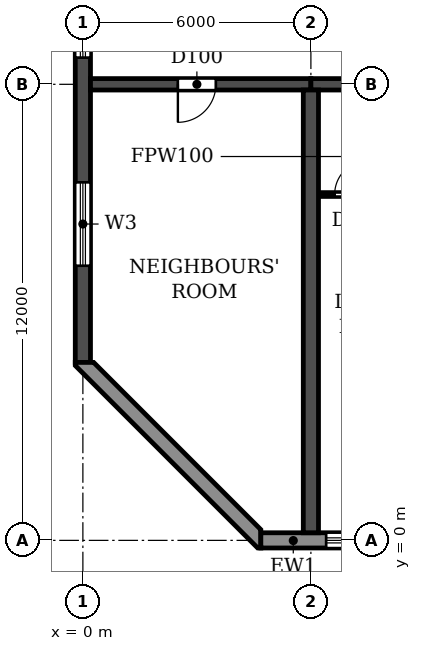
"""IFC4 building model, lengths in metres.
Left out: names, types, materials, properties, quantities, classifications, styles, units other than length and angle.
Written with IfcOpenShell. Run it as: python <this file> out.ifc"""

import sys

from ifc_helpers import new_model, si_unit, direction, frame, frame_2d, origin, place, context, subcontext, project, spatial, polyline, rectangle, outline, extrude, element, fill, save


model = new_model("IFC4")
c1 = context("Model", 3, precision=1e-05, world=origin(), true_north=direction((0.0, 1.0)))
c2 = subcontext(c1, "Body", "Model", "MODEL_VIEW")
j1 = project(units=[si_unit("LENGTHUNIT", "METRE"), si_unit("PLANEANGLEUNIT", "RADIAN")], contexts=[c1])
p1 = place(None, origin())
s1 = spatial("IfcSite", under=j1, at=p1, CompositionType="ELEMENT")
p2 = place(p1, origin())
s2 = spatial("IfcBuilding", under=s1, at=p2, CompositionType="ELEMENT")
p3 = place(p2, frame((0.0, 0.0, 33.3)))
s3 = spatial("IfcBuildingStorey", under=s2, at=p3, CompositionType="ELEMENT", Elevation=33.3)
p4 = place(p3, frame((6.0, 0.2, 0.0), z_axis=(0.0, 0.0, 1.0), x_axis=(0.0, 1.0, 0.0)))
e1 = element("IfcWall", 1, at=p4, inside=s3, PredefinedType="SHEAR", context=c2, shape_type="SweptSolid", body=[
    extrude(rectangle(XDim=11.65, YDim=0.4, at=frame_2d((5.825, 0.0))), origin(), (0.0, 0.0, 1.0), 3.05),
])
p5 = place(p3, frame((0.0, 4.683, 0.0), z_axis=(0.0, 0.0, 1.0), x_axis=(0.0, 1.0, 0.0)))
e2 = element("IfcWall", 2, at=p5, inside=s3, PredefinedType="SHEAR", context=c2, shape_type="SweptSolid", body=[
    extrude(rectangle(XDim=35.434, YDim=0.4, at=frame_2d((17.717, 0.0))), origin(), (0.0, 0.0, 1.0), 3.05),
])
p6 = place(p5, frame((23.817, 0.0, 0.9)))
e3 = element("IfcOpeningElement", 3, at=p6, cuts=e2, PredefinedType="OPENING", context=c2, shape_type="SweptSolid", body=[
    extrude(rectangle(XDim=1.2, YDim=1.5, at=frame_2d((0.6, 0.75))), frame((0.0, 0.21, 0.0), z_axis=(0.0, -1.0, 0.0), x_axis=(1.0, 0.0, 0.0)), (0.0, 0.0, 1.0), 0.42),
])
p7 = place(p5, frame((8.017, 0.0, 0.9)))
e4 = element("IfcOpeningElement", 4, at=p7, cuts=e2, PredefinedType="OPENING", context=c2, shape_type="SweptSolid", body=[
    extrude(rectangle(XDim=1.2, YDim=1.5, at=frame_2d((0.6, 0.75))), frame((0.0, 0.21, 0.0), z_axis=(0.0, -1.0, 0.0), x_axis=(1.0, 0.0, 0.0)), (0.0, 0.0, 1.0), 0.42),
])
p8 = place(p5, frame((15.917, 0.0, 0.9)))
e5 = element("IfcOpeningElement", 5, at=p8, cuts=e2, PredefinedType="OPENING", context=c2, shape_type="SweptSolid", body=[
    extrude(rectangle(XDim=1.2, YDim=1.5, at=frame_2d((0.6, 0.75))), frame((0.0, 0.21, 0.0), z_axis=(0.0, -1.0, 0.0), x_axis=(1.0, 0.0, 0.0)), (0.0, 0.0, 1.0), 0.42),
])
p9 = place(p5, frame((29.493, 0.0, 0.6)))
e6 = element("IfcOpeningElement", 6, at=p9, cuts=e2, PredefinedType="OPENING", context=c2, shape_type="SweptSolid", body=[
    extrude(rectangle(XDim=2.2, YDim=1.8, at=frame_2d((1.1, 0.9))), frame((0.0, 0.21, 0.0), z_axis=(0.0, -1.0, 0.0), x_axis=(1.0, 0.0, 0.0)), (0.0, 0.0, 1.0), 0.42),
])
p10 = place(p5, frame((2.541, 0.0, 0.6)))
e7 = element("IfcOpeningElement", 7, at=p10, cuts=e2, PredefinedType="OPENING", context=c2, shape_type="SweptSolid", body=[
    extrude(rectangle(XDim=2.2, YDim=1.8, at=frame_2d((1.1, 0.9))), frame((0.0, 0.21, 0.0), z_axis=(0.0, -1.0, 0.0), x_axis=(1.0, 0.0, 0.0)), (0.0, 0.0, 1.0), 0.42),
])
p11 = place(p3, frame((0.2, 12.0, 0.0), z_axis=(0.0, 0.0, 1.0), x_axis=(1.0, 0.0, 0.0)))
e8 = element("IfcWall", 8, at=p11, inside=s3, PredefinedType="SHEAR", context=c2, shape_type="SweptSolid", body=[
    extrude(rectangle(XDim=5.8, YDim=0.3, at=frame_2d((2.9, 0.0))), origin(), (0.0, 0.0, 1.0), 2.45),
])
p12 = place(p11, frame((2.3, 0.0, 0.0)))
e9 = element("IfcOpeningElement", 9, at=p12, cuts=e8, PredefinedType="OPENING", context=c2, shape_type="SweptSolid", body=[
    extrude(rectangle(XDim=1.0, YDim=2.1, at=frame_2d((0.5, 1.05))), frame((0.0, 0.16, 0.0), z_axis=(0.0, -1.0, 0.0), x_axis=(1.0, 0.0, 0.0)), (0.0, 0.0, 1.0), 0.32),
])
p13 = place(p3, frame((6.0, 12.0, 0.0), z_axis=(0.0, 0.0, 1.0), x_axis=(1.0, 0.0, 0.0)))
e10 = element("IfcWall", 10, at=p13, inside=s3, PredefinedType="SHEAR", context=c2, shape_type="SweptSolid", body=[
    extrude(rectangle(XDim=6.0, YDim=0.3, at=frame_2d((3.0, 0.0))), origin(), (0.0, 0.0, 1.0), 2.45),
])
p14 = place(p13, frame((2.55, 0.0, 0.0)))
e11 = element("IfcOpeningElement", 11, at=p14, cuts=e10, PredefinedType="OPENING", context=c2, shape_type="SweptSolid", body=[
    extrude(rectangle(XDim=1.0, YDim=2.1, at=frame_2d((0.5, 1.05))), frame((0.0, 0.16, 0.0), z_axis=(0.0, -1.0, 0.0), x_axis=(1.0, 0.0, 0.0)), (0.0, 0.0, 1.0), 0.32),
])
p15 = place(p3, frame((4.683, 0.0, 0.0), z_axis=(0.0, 0.0, 1.0), x_axis=(1.0, 0.0, 0.0)))
e12 = element("IfcWall", 12, at=p15, inside=s3, PredefinedType="STANDARD", context=c2, shape_type="SweptSolid", body=[
    extrude(rectangle(XDim=92.634, YDim=0.4, at=frame_2d((46.317, 0.0))), origin(), (0.0, 0.0, 1.0), 3.05),
])
p16 = place(p15, frame((1.717, 0.0, 0.9)))
e13 = element("IfcOpeningElement", 13, at=p16, cuts=e12, PredefinedType="OPENING", context=c2, shape_type="SweptSolid", body=[
    extrude(rectangle(XDim=2.2, YDim=1.5, at=frame_2d((1.1, 0.75))), frame((0.0, 0.21, 0.0), z_axis=(0.0, -1.0, 0.0), x_axis=(1.0, 0.0, 0.0)), (0.0, 0.0, 1.0), 0.42),
])
p17 = place(p15, frame((4.717, 0.0, 0.9)))
e14 = element("IfcOpeningElement", 14, at=p17, cuts=e12, PredefinedType="OPENING", context=c2, shape_type="SweptSolid", body=[
    extrude(rectangle(XDim=2.2, YDim=1.5, at=frame_2d((1.1, 0.75))), frame((0.0, 0.21, 0.0), z_axis=(0.0, -1.0, 0.0), x_axis=(1.0, 0.0, 0.0)), (0.0, 0.0, 1.0), 0.42),
])
p18 = place(p15, frame((7.917, 0.0, 0.0)))
e15 = element("IfcOpeningElement", 15, at=p18, cuts=e12, PredefinedType="OPENING", context=c2, shape_type="SweptSolid", body=[
    extrude(rectangle(XDim=1.8, YDim=2.4, at=frame_2d((0.9, 1.2))), frame((0.0, 0.21, 0.0), z_axis=(0.0, -1.0, 0.0), x_axis=(1.0, 0.0, 0.0)), (0.0, 0.0, 1.0), 0.42),
])
p19 = place(p15, frame((10.717, 0.0, 0.9)))
e16 = element("IfcOpeningElement", 16, at=p19, cuts=e12, PredefinedType="OPENING", context=c2, shape_type="SweptSolid", body=[
    extrude(rectangle(XDim=2.2, YDim=1.5, at=frame_2d((1.1, 0.75))), frame((0.0, 0.21, 0.0), z_axis=(0.0, -1.0, 0.0), x_axis=(1.0, 0.0, 0.0)), (0.0, 0.0, 1.0), 0.42),
])
p20 = place(p15, frame((13.717, 0.0, 0.9)))
e17 = element("IfcOpeningElement", 17, at=p20, cuts=e12, PredefinedType="OPENING", context=c2, shape_type="SweptSolid", body=[
    extrude(rectangle(XDim=2.2, YDim=1.5, at=frame_2d((1.1, 0.75))), frame((0.0, 0.21, 0.0), z_axis=(0.0, -1.0, 0.0), x_axis=(1.0, 0.0, 0.0)), (0.0, 0.0, 1.0), 0.42),
])
p21 = place(p15, frame((16.717, 0.0, 0.9)))
e18 = element("IfcOpeningElement", 18, at=p21, cuts=e12, PredefinedType="OPENING", context=c2, shape_type="SweptSolid", body=[
    extrude(rectangle(XDim=2.2, YDim=1.5, at=frame_2d((1.1, 0.75))), frame((0.0, 0.21, 0.0), z_axis=(0.0, -1.0, 0.0), x_axis=(1.0, 0.0, 0.0)), (0.0, 0.0, 1.0), 0.42),
])
p22 = place(p15, frame((19.717, 0.0, 0.9)))
e19 = element("IfcOpeningElement", 19, at=p22, cuts=e12, PredefinedType="OPENING", context=c2, shape_type="SweptSolid", body=[
    extrude(rectangle(XDim=2.2, YDim=1.5, at=frame_2d((1.1, 0.75))), frame((0.0, 0.21, 0.0), z_axis=(0.0, -1.0, 0.0), x_axis=(1.0, 0.0, 0.0)), (0.0, 0.0, 1.0), 0.42),
])
p23 = place(p15, frame((22.917, 0.0, 0.0)))
e20 = element("IfcOpeningElement", 20, at=p23, cuts=e12, PredefinedType="OPENING", context=c2, shape_type="SweptSolid", body=[
    extrude(rectangle(XDim=1.8, YDim=2.4, at=frame_2d((0.9, 1.2))), frame((0.0, 0.21, 0.0), z_axis=(0.0, -1.0, 0.0), x_axis=(1.0, 0.0, 0.0)), (0.0, 0.0, 1.0), 0.42),
])
p24 = place(p15, frame((25.717, 0.0, 0.9)))
e21 = element("IfcOpeningElement", 21, at=p24, cuts=e12, PredefinedType="OPENING", context=c2, shape_type="SweptSolid", body=[
    extrude(rectangle(XDim=2.2, YDim=1.5, at=frame_2d((1.1, 0.75))), frame((0.0, 0.21, 0.0), z_axis=(0.0, -1.0, 0.0), x_axis=(1.0, 0.0, 0.0)), (0.0, 0.0, 1.0), 0.42),
])
p25 = place(p15, frame((28.717, 0.0, 0.9)))
e22 = element("IfcOpeningElement", 22, at=p25, cuts=e12, PredefinedType="OPENING", context=c2, shape_type="SweptSolid", body=[
    extrude(rectangle(XDim=2.2, YDim=1.5, at=frame_2d((1.1, 0.75))), frame((0.0, 0.21, 0.0), z_axis=(0.0, -1.0, 0.0), x_axis=(1.0, 0.0, 0.0)), (0.0, 0.0, 1.0), 0.42),
])
p26 = place(p15, frame((31.717, 0.0, 0.9)))
e23 = element("IfcOpeningElement", 23, at=p26, cuts=e12, PredefinedType="OPENING", context=c2, shape_type="SweptSolid", body=[
    extrude(rectangle(XDim=2.2, YDim=1.5, at=frame_2d((1.1, 0.75))), frame((0.0, 0.21, 0.0), z_axis=(0.0, -1.0, 0.0), x_axis=(1.0, 0.0, 0.0)), (0.0, 0.0, 1.0), 0.42),
])
p27 = place(p15, frame((34.717, 0.0, 0.9)))
e24 = element("IfcOpeningElement", 24, at=p27, cuts=e12, PredefinedType="OPENING", context=c2, shape_type="SweptSolid", body=[
    extrude(rectangle(XDim=2.2, YDim=1.5, at=frame_2d((1.1, 0.75))), frame((0.0, 0.21, 0.0), z_axis=(0.0, -1.0, 0.0), x_axis=(1.0, 0.0, 0.0)), (0.0, 0.0, 1.0), 0.42),
])
p28 = place(p15, frame((37.717, 0.0, 0.9)))
e25 = element("IfcOpeningElement", 25, at=p28, cuts=e12, PredefinedType="OPENING", context=c2, shape_type="SweptSolid", body=[
    extrude(rectangle(XDim=2.2, YDim=1.5, at=frame_2d((1.1, 0.75))), frame((0.0, 0.21, 0.0), z_axis=(0.0, -1.0, 0.0), x_axis=(1.0, 0.0, 0.0)), (0.0, 0.0, 1.0), 0.42),
])
p29 = place(p15, frame((40.717, 0.0, 0.9)))
e26 = element("IfcOpeningElement", 26, at=p29, cuts=e12, PredefinedType="OPENING", context=c2, shape_type="SweptSolid", body=[
    extrude(rectangle(XDim=2.2, YDim=1.5, at=frame_2d((1.1, 0.75))), frame((0.0, 0.21, 0.0), z_axis=(0.0, -1.0, 0.0), x_axis=(1.0, 0.0, 0.0)), (0.0, 0.0, 1.0), 0.42),
])
p30 = place(p15, frame((43.717, 0.0, 0.9)))
e27 = element("IfcOpeningElement", 27, at=p30, cuts=e12, PredefinedType="OPENING", context=c2, shape_type="SweptSolid", body=[
    extrude(rectangle(XDim=2.2, YDim=1.5, at=frame_2d((1.1, 0.75))), frame((0.0, 0.21, 0.0), z_axis=(0.0, -1.0, 0.0), x_axis=(1.0, 0.0, 0.0)), (0.0, 0.0, 1.0), 0.42),
])
p31 = place(p15, frame((46.917, 0.0, 0.0)))
e28 = element("IfcOpeningElement", 28, at=p31, cuts=e12, PredefinedType="OPENING", context=c2, shape_type="SweptSolid", body=[
    extrude(rectangle(XDim=1.8, YDim=2.4, at=frame_2d((0.9, 1.2))), frame((0.0, 0.21, 0.0), z_axis=(0.0, -1.0, 0.0), x_axis=(1.0, 0.0, 0.0)), (0.0, 0.0, 1.0), 0.42),
])
p32 = place(p15, frame((49.717, 0.0, 0.9)))
e29 = element("IfcOpeningElement", 29, at=p32, cuts=e12, PredefinedType="OPENING", context=c2, shape_type="SweptSolid", body=[
    extrude(rectangle(XDim=2.2, YDim=1.5, at=frame_2d((1.1, 0.75))), frame((0.0, 0.21, 0.0), z_axis=(0.0, -1.0, 0.0), x_axis=(1.0, 0.0, 0.0)), (0.0, 0.0, 1.0), 0.42),
])
p33 = place(p15, frame((52.717, 0.0, 0.9)))
e30 = element("IfcOpeningElement", 30, at=p33, cuts=e12, PredefinedType="OPENING", context=c2, shape_type="SweptSolid", body=[
    extrude(rectangle(XDim=2.2, YDim=1.5, at=frame_2d((1.1, 0.75))), frame((0.0, 0.21, 0.0), z_axis=(0.0, -1.0, 0.0), x_axis=(1.0, 0.0, 0.0)), (0.0, 0.0, 1.0), 0.42),
])
p34 = place(p15, frame((55.717, 0.0, 0.9)))
e31 = element("IfcOpeningElement", 31, at=p34, cuts=e12, PredefinedType="OPENING", context=c2, shape_type="SweptSolid", body=[
    extrude(rectangle(XDim=2.2, YDim=1.5, at=frame_2d((1.1, 0.75))), frame((0.0, 0.21, 0.0), z_axis=(0.0, -1.0, 0.0), x_axis=(1.0, 0.0, 0.0)), (0.0, 0.0, 1.0), 0.42),
])
p35 = place(p15, frame((58.917, 0.0, 0.0)))
e32 = element("IfcOpeningElement", 32, at=p35, cuts=e12, PredefinedType="OPENING", context=c2, shape_type="SweptSolid", body=[
    extrude(rectangle(XDim=1.8, YDim=2.4, at=frame_2d((0.9, 1.2))), frame((0.0, 0.21, 0.0), z_axis=(0.0, -1.0, 0.0), x_axis=(1.0, 0.0, 0.0)), (0.0, 0.0, 1.0), 0.42),
])
p36 = place(p15, frame((61.717, 0.0, 0.9)))
e33 = element("IfcOpeningElement", 33, at=p36, cuts=e12, PredefinedType="OPENING", context=c2, shape_type="SweptSolid", body=[
    extrude(rectangle(XDim=2.2, YDim=1.5, at=frame_2d((1.1, 0.75))), frame((0.0, 0.21, 0.0), z_axis=(0.0, -1.0, 0.0), x_axis=(1.0, 0.0, 0.0)), (0.0, 0.0, 1.0), 0.42),
])
p37 = place(p15, frame((64.717, 0.0, 0.9)))
e34 = element("IfcOpeningElement", 34, at=p37, cuts=e12, PredefinedType="OPENING", context=c2, shape_type="SweptSolid", body=[
    extrude(rectangle(XDim=2.2, YDim=1.5, at=frame_2d((1.1, 0.75))), frame((0.0, 0.21, 0.0), z_axis=(0.0, -1.0, 0.0), x_axis=(1.0, 0.0, 0.0)), (0.0, 0.0, 1.0), 0.42),
])
p38 = place(p15, frame((67.717, 0.0, 0.9)))
e35 = element("IfcOpeningElement", 35, at=p38, cuts=e12, PredefinedType="OPENING", context=c2, shape_type="SweptSolid", body=[
    extrude(rectangle(XDim=2.2, YDim=1.5, at=frame_2d((1.1, 0.75))), frame((0.0, 0.21, 0.0), z_axis=(0.0, -1.0, 0.0), x_axis=(1.0, 0.0, 0.0)), (0.0, 0.0, 1.0), 0.42),
])
p39 = place(p15, frame((70.917, 0.0, 0.0)))
e36 = element("IfcOpeningElement", 36, at=p39, cuts=e12, PredefinedType="OPENING", context=c2, shape_type="SweptSolid", body=[
    extrude(rectangle(XDim=1.8, YDim=2.4, at=frame_2d((0.9, 1.2))), frame((0.0, 0.21, 0.0), z_axis=(0.0, -1.0, 0.0), x_axis=(1.0, 0.0, 0.0)), (0.0, 0.0, 1.0), 0.42),
])
p40 = place(p15, frame((73.717, 0.0, 0.9)))
e37 = element("IfcOpeningElement", 37, at=p40, cuts=e12, PredefinedType="OPENING", context=c2, shape_type="SweptSolid", body=[
    extrude(rectangle(XDim=2.2, YDim=1.5, at=frame_2d((1.1, 0.75))), frame((0.0, 0.21, 0.0), z_axis=(0.0, -1.0, 0.0), x_axis=(1.0, 0.0, 0.0)), (0.0, 0.0, 1.0), 0.42),
])
p41 = place(p15, frame((76.717, 0.0, 0.9)))
e38 = element("IfcOpeningElement", 38, at=p41, cuts=e12, PredefinedType="OPENING", context=c2, shape_type="SweptSolid", body=[
    extrude(rectangle(XDim=2.2, YDim=1.5, at=frame_2d((1.1, 0.75))), frame((0.0, 0.21, 0.0), z_axis=(0.0, -1.0, 0.0), x_axis=(1.0, 0.0, 0.0)), (0.0, 0.0, 1.0), 0.42),
])
p42 = place(p15, frame((79.717, 0.0, 0.9)))
e39 = element("IfcOpeningElement", 39, at=p42, cuts=e12, PredefinedType="OPENING", context=c2, shape_type="SweptSolid", body=[
    extrude(rectangle(XDim=2.2, YDim=1.5, at=frame_2d((1.1, 0.75))), frame((0.0, 0.21, 0.0), z_axis=(0.0, -1.0, 0.0), x_axis=(1.0, 0.0, 0.0)), (0.0, 0.0, 1.0), 0.42),
])
p43 = place(p15, frame((82.717, 0.0, 0.9)))
e40 = element("IfcOpeningElement", 40, at=p43, cuts=e12, PredefinedType="OPENING", context=c2, shape_type="SweptSolid", body=[
    extrude(rectangle(XDim=2.2, YDim=1.5, at=frame_2d((1.1, 0.75))), frame((0.0, 0.21, 0.0), z_axis=(0.0, -1.0, 0.0), x_axis=(1.0, 0.0, 0.0)), (0.0, 0.0, 1.0), 0.42),
])
p44 = place(p15, frame((85.717, 0.0, 0.9)))
e41 = element("IfcOpeningElement", 41, at=p44, cuts=e12, PredefinedType="OPENING", context=c2, shape_type="SweptSolid", body=[
    extrude(rectangle(XDim=2.2, YDim=1.5, at=frame_2d((1.1, 0.75))), frame((0.0, 0.21, 0.0), z_axis=(0.0, -1.0, 0.0), x_axis=(1.0, 0.0, 0.0)), (0.0, 0.0, 1.0), 0.42),
])
p45 = place(p15, frame((88.717, 0.0, 0.9)))
e42 = element("IfcOpeningElement", 42, at=p45, cuts=e12, PredefinedType="OPENING", context=c2, shape_type="SweptSolid", body=[
    extrude(rectangle(XDim=2.2, YDim=1.5, at=frame_2d((1.1, 0.75))), frame((0.0, 0.21, 0.0), z_axis=(0.0, -1.0, 0.0), x_axis=(1.0, 0.0, 0.0)), (0.0, 0.0, 1.0), 0.42),
])
p46 = place(p3, origin())
e43 = element("IfcWall", 43, at=p46, inside=s3, PredefinedType="STANDARD", context=c2, shape_type="SweptSolid", body=[
    extrude(outline(polyline([(-0.2, 4.683), (-0.2, 4.6), (4.6, -0.2), (4.683, -0.2), (4.683, 0.283), (0.283, 4.683), (-0.2, 4.683)])), origin(), (0.0, 0.0, 1.0), 3.05),
])
p47 = place(p3, frame((6.21, 9.1, 0.0), z_axis=(0.0, 0.0, 1.0), x_axis=(1.0, 0.0, 0.0)))
e44 = element("IfcWall", 44, at=p47, inside=s3, PredefinedType="PARTITIONING", context=c2, shape_type="SweptSolid", body=[
    extrude(rectangle(XDim=1.99, YDim=0.1, at=frame_2d((0.995, 0.0))), origin(), (0.0, 0.0, 1.0), 3.05),
])
p48 = place(p47, frame((0.415, 0.0, 0.0)))
e45 = element("IfcOpeningElement", 45, at=p48, cuts=e44, PredefinedType="OPENING", context=c2, shape_type="SweptSolid", body=[
    extrude(rectangle(XDim=0.9, YDim=2.1, at=frame_2d((0.45, 1.05))), frame((0.0, 0.06, 0.0), z_axis=(0.0, -1.0, 0.0), x_axis=(1.0, 0.0, 0.0)), (0.0, 0.0, 1.0), 0.12),
])
p49 = place(p16, origin())
e46 = element("IfcWindow", 46, at=p49, inside=s3, PartitioningType="DOUBLE_PANEL_HORIZONTAL", PredefinedType="WINDOW", context=c2, shape_type="SweptSolid", body=[
    extrude(rectangle(XDim=2.2, YDim=1.5, at=frame_2d((1.1, 0.75))), frame((0.0, 0.03, 0.0), z_axis=(0.0, -1.0, 0.0), x_axis=(1.0, 0.0, 0.0)), (0.0, 0.0, 1.0), 0.06),
])
fill(e13, e46)
p50 = place(p7, origin())
e47 = element("IfcWindow", 47, at=p50, inside=s3, PartitioningType="SINGLE_PANEL", PredefinedType="WINDOW", context=c2, shape_type="SweptSolid", body=[
    extrude(rectangle(XDim=1.2, YDim=1.5, at=frame_2d((0.6, 0.75))), frame((0.0, 0.03, 0.0), z_axis=(0.0, -1.0, 0.0), x_axis=(1.0, 0.0, 0.0)), (0.0, 0.0, 1.0), 0.06),
])
fill(e4, e47)
p51 = place(p10, origin())
e48 = element("IfcWindow", 48, at=p51, inside=s3, PartitioningType="DOUBLE_PANEL_HORIZONTAL", PredefinedType="WINDOW", context=c2, shape_type="SweptSolid", body=[
    extrude(rectangle(XDim=2.2, YDim=1.8, at=frame_2d((1.1, 0.9))), frame((0.0, 0.03, 0.0), z_axis=(0.0, -1.0, 0.0), x_axis=(1.0, 0.0, 0.0)), (0.0, 0.0, 1.0), 0.06),
])
fill(e7, e48)
p52 = place(p12, frame((1.0, 0.0, 0.0), z_axis=(0.0, 0.0, 1.0), x_axis=(-1.0, 0.0, 0.0)))
e49 = element("IfcDoor", 49, at=p52, inside=s3, OperationType="SINGLE_SWING_RIGHT", PredefinedType="DOOR", context=c2, shape_type="SweptSolid", body=[
    extrude(rectangle(XDim=1.0, YDim=2.1, at=frame_2d((0.5, 1.05))), frame((0.0, 0.025, 0.0), z_axis=(0.0, -1.0, 0.0), x_axis=(1.0, 0.0, 0.0)), (0.0, 0.0, 1.0), 0.05),
])
fill(e9, e49)
p53 = place(p48, origin())
e50 = element("IfcDoor", 50, at=p53, inside=s3, OperationType="SINGLE_SWING_RIGHT", PredefinedType="DOOR", context=c2, shape_type="SweptSolid", body=[
    extrude(rectangle(XDim=0.9, YDim=2.1, at=frame_2d((0.45, 1.05))), frame((0.0, 0.025, 0.0), z_axis=(0.0, -1.0, 0.0), x_axis=(1.0, 0.0, 0.0)), (0.0, 0.0, 1.0), 0.05),
])
fill(e45, e50)
save(model, sys.argv[1])
